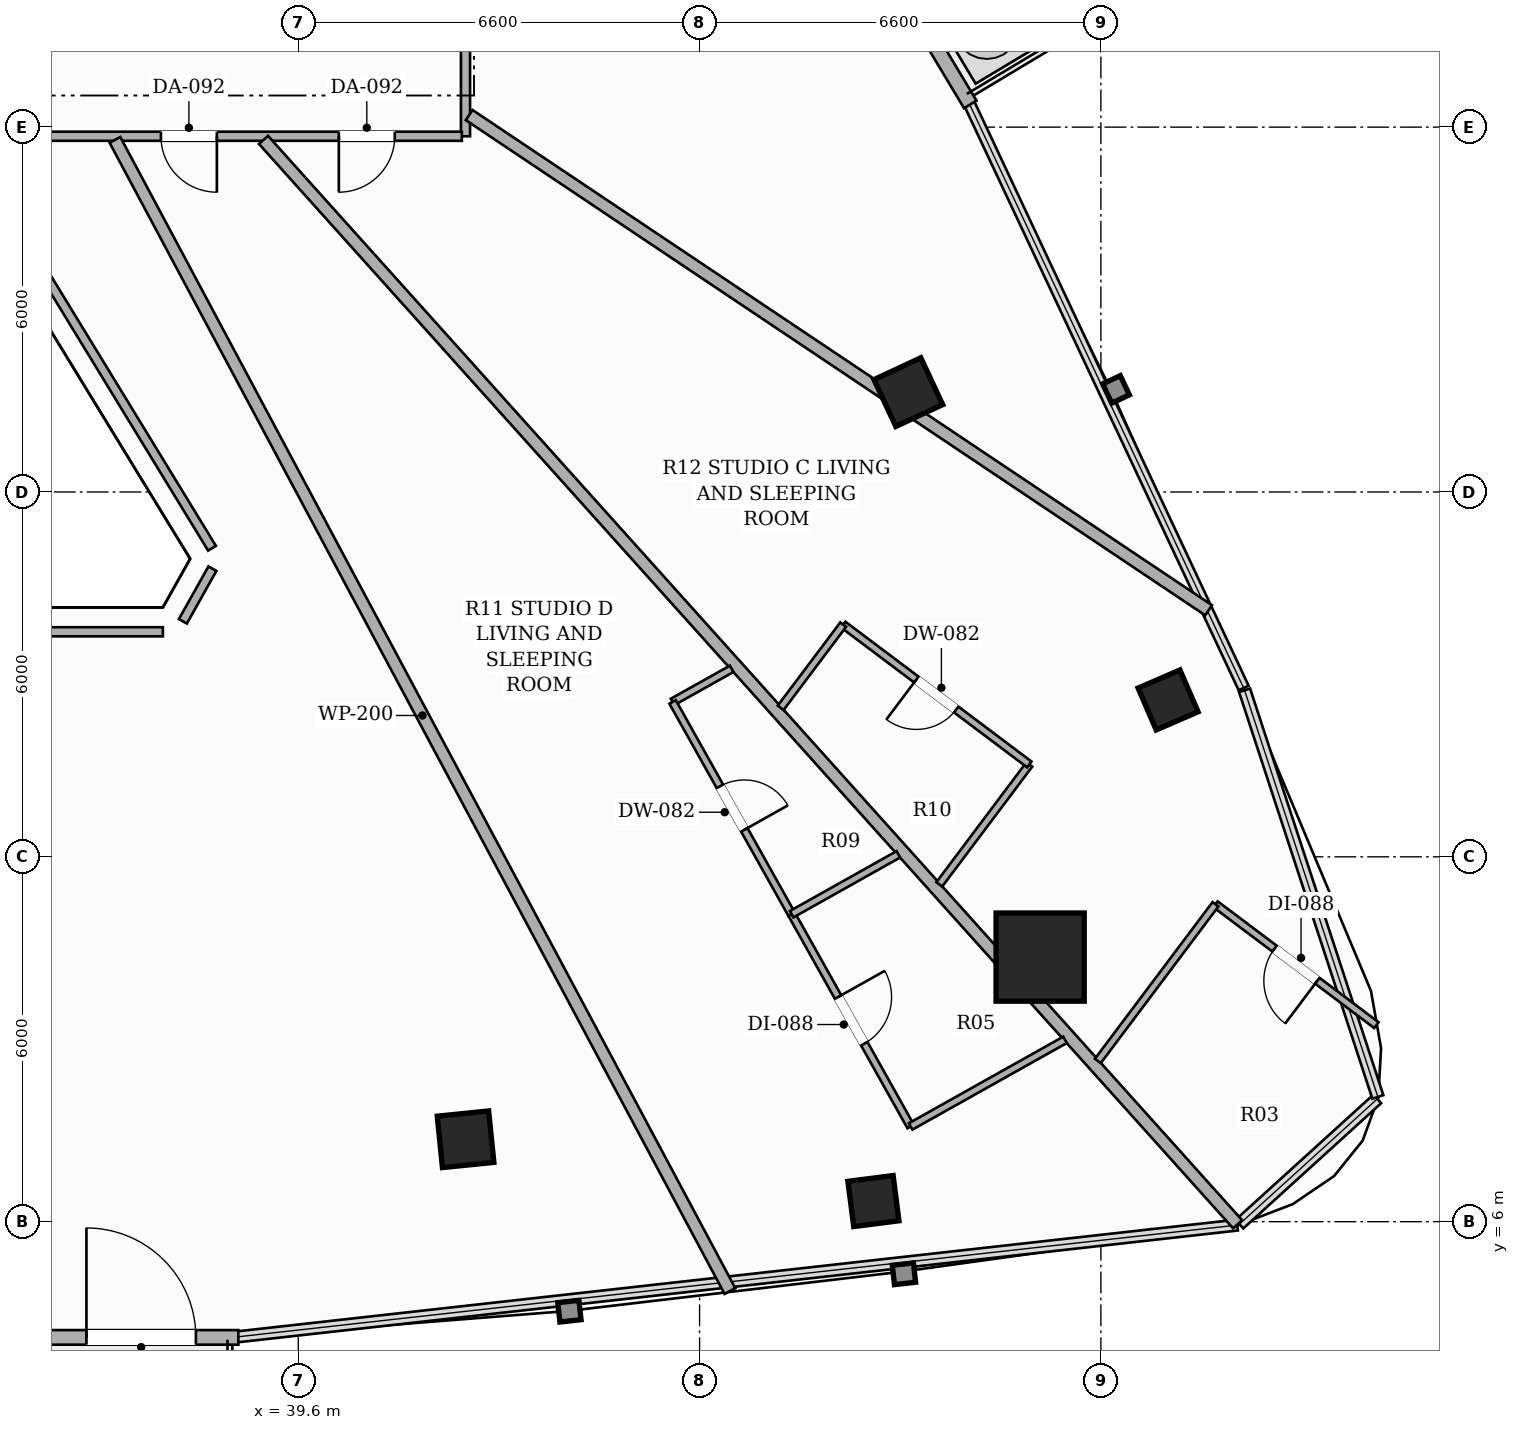
"""IFC4 building model, lengths in metres.
Left out: names, types, materials, properties, quantities, classifications, styles, units other than length and angle.
Written with IfcOpenShell. Run it as: python <this file> out.ifc"""

import sys

from ifc_helpers import new_model, si_unit, direction, frame, frame_2d, origin, origin_2d, place, context, subcontext, project, spatial, rectangle, hollow_rectangle, extrude, element, fill, save


model = new_model("IFC4")
c1 = context("Model", 3, precision=1e-05, world=origin(), true_north=direction((0.0, 1.0)))
c2 = subcontext(c1, "Body", "Model", "MODEL_VIEW")
j1 = project(units=[si_unit("LENGTHUNIT", "METRE"), si_unit("PLANEANGLEUNIT", "RADIAN")], contexts=[c1])
p1 = place(None, origin())
s1 = spatial("IfcSite", under=j1, at=p1, CompositionType="ELEMENT")
p2 = place(p1, origin())
s2 = spatial("IfcBuilding", under=s1, at=p2, CompositionType="ELEMENT")
p3 = place(p2, frame((0.0, 0.0, 180.35)))
s3 = spatial("IfcBuildingStorey", under=s2, at=p3, CompositionType="ELEMENT", Elevation=180.35)
p4 = place(p3, frame((51.801, 10.351, 0.0), z_axis=(0.0, 0.0, 1.0), x_axis=(1.0, 0.0, 0.0)))
e1 = element("IfcColumn", 1, at=p4, inside=s3, PredefinedType="COLUMN", context=c2, shape_type="SweptSolid", body=[
    extrude(hollow_rectangle(XDim=1.45, YDim=1.45, WallThickness=0.045, at=origin_2d()), origin(), (0.0, 0.0, 1.0), 3.3),
])
for number, where, z_axis, x_axis in (
    (2, (42.351, 7.355, 0.0), (0.0, 0.0, 1.0), (0.995, 0.101, 0.0)),
    (3, (49.633, 19.642, 0.0), (0.0, 0.0, 1.0), (-0.423, 0.906, 0.0)),
):
    element("IfcColumn", number, at=place(p3, frame(where, z_axis=z_axis, x_axis=x_axis)), inside=s3, PredefinedType="COLUMN", context=c2, shape_type="SweptSolid", body=[
        extrude(hollow_rectangle(XDim=0.85, YDim=0.85, WallThickness=0.028, at=origin_2d()), origin(), (0.0, 0.0, 1.0), 3.3),
    ])
for number, where, z_axis, x_axis in (
    (4, (49.059, 6.339, 0.0), (0.0, 0.0, 1.0), (0.992, 0.127, 0.0)),
    (5, (53.905, 14.58, 0.0), (0.0, 0.0, 1.0), (-0.397, 0.918, 0.0)),
):
    element("IfcColumn", number, at=place(p3, frame(where, z_axis=z_axis, x_axis=x_axis)), inside=s3, PredefinedType="COLUMN", context=c2, shape_type="SweptSolid", body=[
        extrude(hollow_rectangle(XDim=0.75, YDim=0.75, WallThickness=0.025, at=origin_2d()), origin(), (0.0, 0.0, 1.0), 3.3),
    ])
p5 = place(p3, frame((27.386, 4.097, 0.0), z_axis=(0.0, 0.0, 1.0), x_axis=(1.0, 0.0, 0.0)))
e6 = element("IfcWall", 6, at=p5, inside=s3, PredefinedType="SOLIDWALL", context=c2, shape_type="SweptSolid", body=[
    extrude(rectangle(XDim=11.228, YDim=0.24, at=frame_2d((5.614, 0.0))), origin(), (0.0, 0.0, 1.0), 2.624),
])
p6 = place(p5, frame((8.73, 0.0, 0.0)))
e7 = element("IfcOpeningElement", 7, at=p6, cuts=e6, PredefinedType="OPENING", context=c2, shape_type="SweptSolid", body=[
    extrude(rectangle(XDim=1.8, YDim=2.2, at=frame_2d((0.9, 1.1))), frame((0.0, 0.13, 0.0), z_axis=(0.0, -1.0, 0.0), x_axis=(1.0, 0.0, 0.0)), (0.0, 0.0, 1.0), 0.26),
])
p7 = place(p3, frame((50.652, 24.373, 0.0), z_axis=(0.0, 0.0, 1.0), x_axis=(-0.514290689074, 0.857615932182, 0.0)))
e8 = element("IfcWall", 8, at=p7, inside=s3, PredefinedType="SOLIDWALL", context=c2, shape_type="SweptSolid", body=[
    extrude(rectangle(XDim=10.856, YDim=0.24, at=frame_2d((5.428, 0.0))), origin(), (0.0, 0.0, 1.0), 2.624),
])
p8 = place(p7, frame((8.358, 0.0, 0.0)))
e9 = element("IfcOpeningElement", 9, at=p8, cuts=e8, PredefinedType="OPENING", context=c2, shape_type="SweptSolid", body=[
    extrude(rectangle(XDim=1.8, YDim=2.2, at=frame_2d((0.9, 1.1))), frame((0.0, 0.13, 0.0), z_axis=(0.0, -1.0, 0.0), x_axis=(1.0, 0.0, 0.0)), (0.0, 0.0, 1.0), 0.26),
])
p9 = place(p3, frame((42.35, 28.34, 0.0), z_axis=(0.0, 0.0, 1.0), x_axis=(0.0, -1.0, 0.0)))
e10 = element("IfcWall", 10, at=p9, inside=s3, PredefinedType="PARTITIONING", context=c2, shape_type="SweptSolid", body=[
    extrude(rectangle(XDim=4.49, YDim=0.15, at=frame_2d((2.245, 0.0))), origin(), (0.0, 0.0, 1.0), 2.721),
])
p10 = place(p9, frame((1.783, 0.0, 0.0)))
e11 = element("IfcOpeningElement", 11, at=p10, cuts=e10, PredefinedType="OPENING", context=c2, shape_type="SweptSolid", body=[
    extrude(rectangle(XDim=0.88, YDim=2.1, at=frame_2d((0.44, 1.05))), frame((0.0, 0.085, 0.0), z_axis=(0.0, -1.0, 0.0), x_axis=(1.0, 0.0, 0.0)), (0.0, 0.0, 1.0), 0.17),
])
p11 = place(p3, frame((42.29, 23.85, 0.0), z_axis=(0.0, 0.0, 1.0), x_axis=(-1.0, 0.0, 0.0)))
e12 = element("IfcWall", 12, at=p11, inside=s3, PredefinedType="PARTITIONING", context=c2, shape_type="SweptSolid", body=[
    extrude(rectangle(XDim=8.248, YDim=0.15, at=frame_2d((4.124, 0.0))), origin(), (0.0, 0.0, 1.0), 2.492),
])
p12 = place(p11, frame((1.103, 0.0, 0.0)))
e13 = element("IfcOpeningElement", 13, at=p12, cuts=e12, PredefinedType="OPENING", context=c2, shape_type="SweptSolid", body=[
    extrude(rectangle(XDim=0.92, YDim=2.15, at=frame_2d((0.46, 1.075))), frame((0.0, 0.085, 0.0), z_axis=(0.0, -1.0, 0.0), x_axis=(1.0, 0.0, 0.0)), (0.0, 0.0, 1.0), 0.17),
])
p13 = place(p11, frame((4.029, 0.0, 0.0)))
e14 = element("IfcOpeningElement", 14, at=p13, cuts=e12, PredefinedType="OPENING", context=c2, shape_type="SweptSolid", body=[
    extrude(rectangle(XDim=0.92, YDim=2.15, at=frame_2d((0.46, 1.075))), frame((0.0, 0.085, 0.0), z_axis=(0.0, -1.0, 0.0), x_axis=(1.0, 0.0, 0.0)), (0.0, 0.0, 1.0), 0.17),
])
p14 = place(p3, frame((34.079, 23.79, 0.0), z_axis=(0.0, 0.0, 1.0), x_axis=(0.521278062647, -0.853386888465, 0.0)))
e15 = element("IfcWall", 15, at=p14, inside=s3, PredefinedType="PARTITIONING", context=c2, shape_type="SweptSolid", body=[
    extrude(rectangle(XDim=7.869, YDim=0.15, at=frame_2d((3.934, 0.0))), origin(), (0.0, 0.0, 1.0), 2.721),
])
p15 = place(p3, frame((38.188, 16.739, 0.0), z_axis=(0.0, 0.0, 1.0), x_axis=(-0.489479004575, -0.872015082485, 0.0)))
e16 = element("IfcWall", 16, at=p15, inside=s3, PredefinedType="PARTITIONING", context=c2, shape_type="SweptSolid", body=[
    extrude(rectangle(XDim=0.993, YDim=0.15, at=frame_2d((0.497, 0.0))), origin(), (0.0, 0.0, 1.0), 3.06),
])
p16 = place(p3, frame((37.373, 15.701, 0.0), z_axis=(0.0, 0.0, 1.0), x_axis=(-1.0, 0.0, 0.0)))
e17 = element("IfcWall", 17, at=p16, inside=s3, PredefinedType="PARTITIONING", context=c2, shape_type="SweptSolid", body=[
    extrude(rectangle(XDim=8.746, YDim=0.15, at=frame_2d((4.373, 0.0))), origin(), (0.0, 0.0, 1.0), 2.721),
])
p17 = place(p3, frame((36.585, 23.79, 0.0), z_axis=(0.0, 0.0, 1.0), x_axis=(0.47121923303, -0.88201611914, 0.0)))
e18 = element("IfcWall", 18, at=p17, inside=s3, PredefinedType="PARTITIONING", context=c2, shape_type="SweptSolid", body=[
    extrude(rectangle(XDim=21.463, YDim=0.2, at=frame_2d((10.732, 0.0))), origin(), (0.0, 0.0, 1.0), 2.413),
])
p18 = place(p3, frame((54.571, 16.055, 0.0), z_axis=(0.0, 0.0, 1.0), x_axis=(-0.830893680957, 0.556431209535, 0.0)))
e19 = element("IfcWall", 19, at=p18, inside=s3, PredefinedType="PARTITIONING", context=c2, shape_type="SweptSolid", body=[
    extrude(rectangle(XDim=14.636, YDim=0.2, at=frame_2d((7.318, 0.0))), origin(), (0.0, 0.0, 1.0), 2.413),
])
p19 = place(p3, frame((55.049, 5.957, 0.0), z_axis=(0.0, 0.0, 1.0), x_axis=(-0.668302779631, 0.743889369958, 0.0)))
e20 = element("IfcWall", 20, at=p19, inside=s3, PredefinedType="PARTITIONING", context=c2, shape_type="SweptSolid", body=[
    extrude(rectangle(XDim=23.973, YDim=0.2, at=frame_2d((11.986, 0.0))), origin(), (0.0, 0.0, 1.0), 2.413),
])
p20 = place(p3, frame((50.142, 11.547, 0.0), z_axis=(0.0, 0.0, 1.0), x_axis=(0.600522581987, 0.799607796688, 0.0)))
e21 = element("IfcWall", 21, at=p20, inside=s3, PredefinedType="PARTITIONING", context=c2, shape_type="SweptSolid", body=[
    extrude(rectangle(XDim=2.466, YDim=0.12, at=frame_2d((1.233, 0.0))), origin(), (0.0, 0.0, 1.0), 2.492),
])
p21 = place(p3, frame((51.623, 13.519, 0.0), z_axis=(0.0, 0.0, 1.0), x_axis=(-0.799464069649, 0.600713909728, 0.0)))
e22 = element("IfcWall", 22, at=p21, inside=s3, PredefinedType="PARTITIONING", context=c2, shape_type="SweptSolid", body=[
    extrude(rectangle(XDim=3.829, YDim=0.12, at=frame_2d((1.915, 0.0))), origin(), (0.0, 0.0, 1.0), 3.06),
])
p22 = place(p21, frame((1.504, 0.0, 0.0)))
e23 = element("IfcOpeningElement", 23, at=p22, cuts=e22, PredefinedType="OPENING", context=c2, shape_type="SweptSolid", body=[
    extrude(rectangle(XDim=0.82, YDim=2.1, at=frame_2d((0.41, 1.05))), frame((0.0, 0.07, 0.0), z_axis=(0.0, -1.0, 0.0), x_axis=(1.0, 0.0, 0.0)), (0.0, 0.0, 1.0), 0.14),
])
p23 = place(p3, frame((48.562, 15.819, 0.0), z_axis=(0.0, 0.0, 1.0), x_axis=(-0.600820734403, -0.799383790874, 0.0)))
e24 = element("IfcWall", 24, at=p23, inside=s3, PredefinedType="PARTITIONING", context=c2, shape_type="SweptSolid", body=[
    extrude(rectangle(XDim=1.713, YDim=0.12, at=frame_2d((0.856, 0.0))), origin(), (0.0, 0.0, 1.0), 2.492),
])
p24 = place(p3, frame((57.331, 9.232, 0.0), z_axis=(0.0, 0.0, 1.0), x_axis=(-0.799486289087, 0.600684337704, 0.0)))
e25 = element("IfcWall", 25, at=p24, inside=s3, PredefinedType="PARTITIONING", context=c2, shape_type="SweptSolid", body=[
    extrude(rectangle(XDim=3.31, YDim=0.12, at=frame_2d((1.655, 0.0))), origin(), (0.0, 0.0, 1.0), 3.06),
])
p25 = place(p24, frame((1.215, 0.0, 0.0)))
e26 = element("IfcOpeningElement", 26, at=p25, cuts=e25, PredefinedType="OPENING", context=c2, shape_type="SweptSolid", body=[
    extrude(rectangle(XDim=0.88, YDim=2.1, at=frame_2d((0.44, 1.05))), frame((0.0, 0.07, 0.0), z_axis=(0.0, -1.0, 0.0), x_axis=(1.0, 0.0, 0.0)), (0.0, 0.0, 1.0), 0.14),
])
p26 = place(p3, frame((54.685, 11.22, 0.0), z_axis=(0.0, 0.0, 1.0), x_axis=(-0.600472636757, -0.799645304185, 0.0)))
e27 = element("IfcWall", 27, at=p26, inside=s3, PredefinedType="PARTITIONING", context=c2, shape_type="SweptSolid", body=[
    extrude(rectangle(XDim=3.223, YDim=0.12, at=frame_2d((1.611, 0.0))), origin(), (0.0, 0.0, 1.0), 3.06),
])
p27 = place(p3, frame((46.728, 15.092, 0.0), z_axis=(0.0, 0.0, 1.0), x_axis=(-0.872259310975, -0.489043652875, 0.0)))
e28 = element("IfcWall", 28, at=p27, inside=s3, PredefinedType="PARTITIONING", context=c2, shape_type="SweptSolid", body=[
    extrude(rectangle(XDim=1.114, YDim=0.12, at=frame_2d((0.557, 0.0))), origin(), (0.0, 0.0, 1.0), 3.06),
])
p28 = place(p3, frame((45.756, 14.547, 0.0), z_axis=(0.0, 0.0, 1.0), x_axis=(0.489160448732, -0.872193817564, 0.0)))
e29 = element("IfcWall", 29, at=p28, inside=s3, PredefinedType="PARTITIONING", context=c2, shape_type="SweptSolid", body=[
    extrude(rectangle(XDim=4.003, YDim=0.12, at=frame_2d((2.001, 0.0))), origin(), (0.0, 0.0, 1.0), 3.06),
])
p29 = place(p28, frame((1.591, 0.0, 0.0)))
e30 = element("IfcOpeningElement", 30, at=p29, cuts=e29, PredefinedType="OPENING", context=c2, shape_type="SweptSolid", body=[
    extrude(rectangle(XDim=0.82, YDim=2.1, at=frame_2d((0.41, 1.05))), frame((0.0, 0.07, 0.0), z_axis=(0.0, -1.0, 0.0), x_axis=(1.0, 0.0, 0.0)), (0.0, 0.0, 1.0), 0.14),
])
p30 = place(p3, frame((47.714, 11.056, 0.0), z_axis=(0.0, 0.0, 1.0), x_axis=(0.489058521283, -0.87225097464, 0.0)))
e31 = element("IfcWall", 31, at=p30, inside=s3, PredefinedType="PARTITIONING", context=c2, shape_type="SweptSolid", body=[
    extrude(rectangle(XDim=4.001, YDim=0.12, at=frame_2d((2.0, 0.0))), origin(), (0.0, 0.0, 1.0), 2.413),
])
p31 = place(p30, frame((1.561, 0.0, 0.0)))
e32 = element("IfcOpeningElement", 32, at=p31, cuts=e31, PredefinedType="OPENING", context=c2, shape_type="SweptSolid", body=[
    extrude(rectangle(XDim=0.88, YDim=2.1, at=frame_2d((0.44, 1.05))), frame((0.0, 0.07, 0.0), z_axis=(0.0, -1.0, 0.0), x_axis=(1.0, 0.0, 0.0)), (0.0, 0.0, 1.0), 0.14),
])
p32 = place(p3, frame((49.671, 7.566, 0.0), z_axis=(0.0, 0.0, 1.0), x_axis=(0.872184059235, 0.489177847838, 0.0)))
e33 = element("IfcWall", 33, at=p32, inside=s3, PredefinedType="PARTITIONING", context=c2, shape_type="SweptSolid", body=[
    extrude(rectangle(XDim=2.911, YDim=0.12, at=frame_2d((1.456, 0.0))), origin(), (0.0, 0.0, 1.0), 2.413),
])
p33 = place(p3, frame((49.469, 12.041, 0.0), z_axis=(0.0, 0.0, 1.0), x_axis=(-0.872002863311, -0.489500772602, 0.0)))
e34 = element("IfcWall", 34, at=p33, inside=s3, PredefinedType="PARTITIONING", context=c2, shape_type="SweptSolid", body=[
    extrude(rectangle(XDim=2.012, YDim=0.12, at=frame_2d((1.006, 0.0))), origin(), (0.0, 0.0, 1.0), 3.06),
])
p34 = place(p6, origin())
e35 = element("IfcDoor", 35, at=p34, inside=s3, OperationType="SINGLE_SWING_LEFT", PredefinedType="DOOR", context=c2, shape_type="SweptSolid", body=[
    extrude(rectangle(XDim=1.8, YDim=2.2, at=frame_2d((0.9, 1.1))), frame((0.0, 0.025, 0.0), z_axis=(0.0, -1.0, 0.0), x_axis=(1.0, 0.0, 0.0)), (0.0, 0.0, 1.0), 0.05),
])
fill(e7, e35)
p35 = place(p12, origin())
e36 = element("IfcDoor", 36, at=p35, inside=s3, OperationType="SINGLE_SWING_RIGHT", PredefinedType="DOOR", context=c2, shape_type="SweptSolid", body=[
    extrude(rectangle(XDim=0.92, YDim=2.15, at=frame_2d((0.46, 1.075))), frame((0.0, 0.025, 0.0), z_axis=(0.0, -1.0, 0.0), x_axis=(1.0, 0.0, 0.0)), (0.0, 0.0, 1.0), 0.05),
])
fill(e13, e36)
p36 = place(p22, origin())
e37 = element("IfcDoor", 37, at=p36, inside=s3, OperationType="SINGLE_SWING_RIGHT", PredefinedType="DOOR", context=c2, shape_type="SweptSolid", body=[
    extrude(rectangle(XDim=0.82, YDim=2.1, at=frame_2d((0.41, 1.05))), frame((0.0, 0.025, 0.0), z_axis=(0.0, -1.0, 0.0), x_axis=(1.0, 0.0, 0.0)), (0.0, 0.0, 1.0), 0.05),
])
fill(e23, e37)
p37 = place(p25, origin())
e38 = element("IfcDoor", 38, at=p37, inside=s3, OperationType="SINGLE_SWING_LEFT", PredefinedType="DOOR", context=c2, shape_type="SweptSolid", body=[
    extrude(rectangle(XDim=0.88, YDim=2.1, at=frame_2d((0.44, 1.05))), frame((0.0, 0.025, 0.0), z_axis=(0.0, -1.0, 0.0), x_axis=(1.0, 0.0, 0.0)), (0.0, 0.0, 1.0), 0.05),
])
fill(e26, e38)
p38 = place(p13, origin())
e39 = element("IfcDoor", 39, at=p38, inside=s3, OperationType="SINGLE_SWING_LEFT", PredefinedType="DOOR", context=c2, shape_type="SweptSolid", body=[
    extrude(rectangle(XDim=0.92, YDim=2.15, at=frame_2d((0.46, 1.075))), frame((0.0, 0.025, 0.0), z_axis=(0.0, -1.0, 0.0), x_axis=(1.0, 0.0, 0.0)), (0.0, 0.0, 1.0), 0.05),
])
fill(e14, e39)
p39 = place(p29, origin())
e40 = element("IfcDoor", 40, at=p39, inside=s3, OperationType="SINGLE_SWING_RIGHT", PredefinedType="DOOR", context=c2, shape_type="SweptSolid", body=[
    extrude(rectangle(XDim=0.82, YDim=2.1, at=frame_2d((0.41, 1.05))), frame((0.0, 0.025, 0.0), z_axis=(0.0, -1.0, 0.0), x_axis=(1.0, 0.0, 0.0)), (0.0, 0.0, 1.0), 0.05),
])
fill(e30, e40)
p40 = place(p31, origin())
e41 = element("IfcDoor", 41, at=p40, inside=s3, OperationType="SINGLE_SWING_LEFT", PredefinedType="DOOR", context=c2, shape_type="SweptSolid", body=[
    extrude(rectangle(XDim=0.88, YDim=2.1, at=frame_2d((0.44, 1.05))), frame((0.0, 0.025, 0.0), z_axis=(0.0, -1.0, 0.0), x_axis=(1.0, 0.0, 0.0)), (0.0, 0.0, 1.0), 0.05),
])
fill(e32, e41)
save(model, sys.argv[1])
